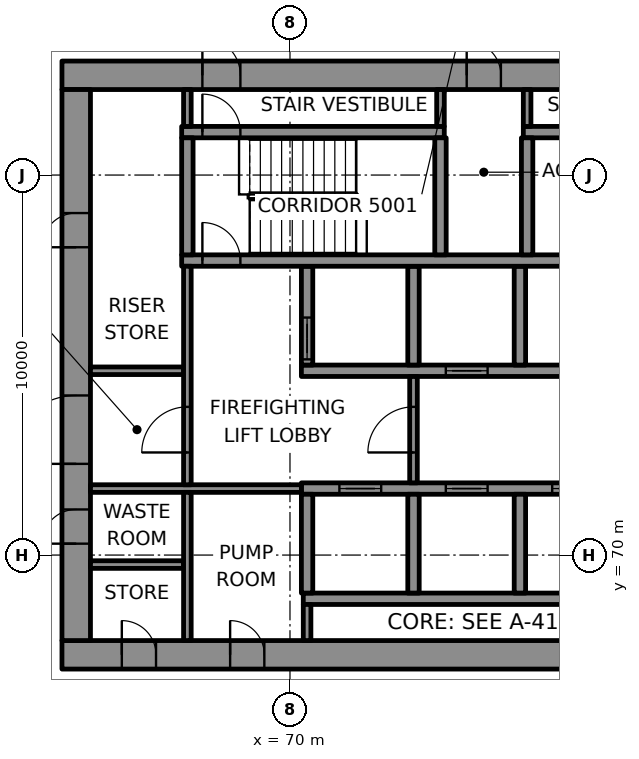
"""IFC4 building model, lengths in metres.
Left out: names, types, materials, properties, quantities, classifications, styles, units other than length and angle.
Written with IfcOpenShell. Run it as: python <this file> out.ifc"""

import sys

from ifc_helpers import new_model, si_unit, direction, frame, frame_2d, origin, place, context, subcontext, project, spatial, rectangle, extrude, element, fill, save


model = new_model("IFC4")
c1 = context("Model", 3, precision=1e-05, world=origin(), true_north=direction((0.0, 1.0)))
c2 = subcontext(c1, "Body", "Model", "MODEL_VIEW")
j1 = project(units=[si_unit("LENGTHUNIT", "METRE"), si_unit("PLANEANGLEUNIT", "RADIAN")], contexts=[c1])
p1 = place(None, origin())
s1 = spatial("IfcSite", under=j1, at=p1, CompositionType="ELEMENT")
p2 = place(p1, origin())
s2 = spatial("IfcBuilding", under=s1, at=p2, CompositionType="ELEMENT")
p3 = place(p2, frame((0.0, 0.0, 214.3)))
s3 = spatial("IfcBuildingStorey", under=s2, at=p3, CompositionType="ELEMENT", Elevation=214.3)
p4 = place(p3, frame((64.0, 67.375, 0.0), z_axis=(0.0, 0.0, 1.0), x_axis=(1.0, 0.0, 0.0)))
e1 = element("IfcWall", 1, at=p4, inside=s3, PredefinedType="SHEAR", context=c2, shape_type="SweptSolid", body=[
    extrude(rectangle(XDim=22.0, YDim=0.75, at=frame_2d((11.0, 0.0))), origin(), (0.0, 0.0, 1.0), 3.7),
])
p5 = place(p4, frame((1.575, 0.0, 0.0)))
e2 = element("IfcOpeningElement", 2, at=p5, cuts=e1, PredefinedType="OPENING", context=c2, shape_type="SweptSolid", body=[
    extrude(rectangle(XDim=0.9, YDim=2.1, at=frame_2d((0.45, 1.05))), frame((0.0, 0.385, 0.0), z_axis=(0.0, -1.0, 0.0), x_axis=(1.0, 0.0, 0.0)), (0.0, 0.0, 1.0), 0.77),
])
p6 = place(p4, frame((4.425, 0.0, 0.0)))
e3 = element("IfcOpeningElement", 3, at=p6, cuts=e1, PredefinedType="OPENING", context=c2, shape_type="SweptSolid", body=[
    extrude(rectangle(XDim=0.9, YDim=2.1, at=frame_2d((0.45, 1.05))), frame((0.0, 0.385, 0.0), z_axis=(0.0, -1.0, 0.0), x_axis=(1.0, 0.0, 0.0)), (0.0, 0.0, 1.0), 0.77),
])
p7 = place(p3, frame((64.0, 82.625, 0.0), z_axis=(0.0, 0.0, 1.0), x_axis=(1.0, 0.0, 0.0)))
e4 = element("IfcWall", 4, at=p7, inside=s3, PredefinedType="SHEAR", context=c2, shape_type="SweptSolid", body=[
    extrude(rectangle(XDim=22.0, YDim=0.75, at=frame_2d((11.0, 0.0))), origin(), (0.0, 0.0, 1.0), 3.7),
])
p8 = place(p7, frame((3.695, 0.0, 0.0)))
e5 = element("IfcOpeningElement", 5, at=p8, cuts=e4, PredefinedType="OPENING", context=c2, shape_type="SweptSolid", body=[
    extrude(rectangle(XDim=1.0, YDim=2.1, at=frame_2d((0.5, 1.05))), frame((0.0, 0.385, 0.0), z_axis=(0.0, -1.0, 0.0), x_axis=(1.0, 0.0, 0.0)), (0.0, 0.0, 1.0), 0.77),
])
p9 = place(p7, frame((17.505, 0.0, 0.0)))
e6 = element("IfcOpeningElement", 6, at=p9, cuts=e4, PredefinedType="OPENING", context=c2, shape_type="SweptSolid", body=[
    extrude(rectangle(XDim=1.0, YDim=2.1, at=frame_2d((0.5, 1.05))), frame((0.0, 0.385, 0.0), z_axis=(0.0, -1.0, 0.0), x_axis=(1.0, 0.0, 0.0)), (0.0, 0.0, 1.0), 0.77),
])
p10 = place(p7, frame((10.65, 0.0, 0.0)))
e7 = element("IfcOpeningElement", 7, at=p10, cuts=e4, PredefinedType="OPENING", context=c2, shape_type="SweptSolid", body=[
    extrude(rectangle(XDim=0.9, YDim=2.1, at=frame_2d((0.45, 1.05))), frame((0.0, 0.385, 0.0), z_axis=(0.0, -1.0, 0.0), x_axis=(1.0, 0.0, 0.0)), (0.0, 0.0, 1.0), 0.77),
])
p11 = place(p3, frame((64.375, 67.75, 0.0), z_axis=(0.0, 0.0, 1.0), x_axis=(0.0, 1.0, 0.0)))
e8 = element("IfcWall", 8, at=p11, inside=s3, PredefinedType="SHEAR", context=c2, shape_type="SweptSolid", body=[
    extrude(rectangle(XDim=14.5, YDim=0.75, at=frame_2d((7.25, 0.0))), origin(), (0.0, 0.0, 1.0), 3.7),
])
p12 = place(p11, frame((4.65, 0.0, 0.0)))
e9 = element("IfcOpeningElement", 9, at=p12, cuts=e8, PredefinedType="OPENING", context=c2, shape_type="SweptSolid", body=[
    extrude(rectangle(XDim=1.8, YDim=2.1, at=frame_2d((0.9, 1.05))), frame((0.0, 0.385, 0.0), z_axis=(0.0, -1.0, 0.0), x_axis=(1.0, 0.0, 0.0)), (0.0, 0.0, 1.0), 0.77),
])
p13 = place(p11, frame((2.55, 0.0, 0.0)))
e10 = element("IfcOpeningElement", 10, at=p13, cuts=e8, PredefinedType="OPENING", context=c2, shape_type="SweptSolid", body=[
    extrude(rectangle(XDim=0.9, YDim=2.1, at=frame_2d((0.45, 1.05))), frame((0.0, 0.385, 0.0), z_axis=(0.0, -1.0, 0.0), x_axis=(1.0, 0.0, 0.0)), (0.0, 0.0, 1.0), 0.77),
])
p14 = place(p11, frame((10.35, 0.0, 0.0)))
e11 = element("IfcOpeningElement", 11, at=p14, cuts=e8, PredefinedType="OPENING", context=c2, shape_type="SweptSolid", body=[
    extrude(rectangle(XDim=0.9, YDim=2.1, at=frame_2d((0.45, 1.05))), frame((0.0, 0.385, 0.0), z_axis=(0.0, -1.0, 0.0), x_axis=(1.0, 0.0, 0.0)), (0.0, 0.0, 1.0), 0.77),
])
p15 = place(p3, frame((70.35, 68.85, 0.0), z_axis=(0.0, 0.0, 1.0), x_axis=(1.0, 0.0, 0.0)))
e12 = element("IfcWall", 12, at=p15, inside=s3, PredefinedType="SHEAR", context=c2, shape_type="SweptSolid", body=[
    extrude(rectangle(XDim=14.2, YDim=0.3, at=frame_2d((7.1, 0.0))), origin(), (0.0, 0.0, 1.0), 3.7),
])
p16 = place(p3, frame((70.3, 71.75, 0.0), z_axis=(0.0, 0.0, 1.0), x_axis=(1.0, 0.0, 0.0)))
e13 = element("IfcWall", 13, at=p16, inside=s3, PredefinedType="SHEAR", context=c2, shape_type="SweptSolid", body=[
    extrude(rectangle(XDim=14.3, YDim=0.3, at=frame_2d((7.15, 0.0))), origin(), (0.0, 0.0, 1.0), 3.7),
])
p17 = place(p16, frame((1.0, 0.0, 0.0)))
e14 = element("IfcOpeningElement", 14, at=p17, cuts=e13, PredefinedType="OPENING", context=c2, shape_type="SweptSolid", body=[
    extrude(rectangle(XDim=1.1, YDim=2.1, at=frame_2d((0.55, 1.05))), frame((0.0, 0.16, 0.0), z_axis=(0.0, -1.0, 0.0), x_axis=(1.0, 0.0, 0.0)), (0.0, 0.0, 1.0), 0.32),
])
p18 = place(p16, frame((3.8, 0.0, 0.0)))
e15 = element("IfcOpeningElement", 15, at=p18, cuts=e13, PredefinedType="OPENING", context=c2, shape_type="SweptSolid", body=[
    extrude(rectangle(XDim=1.1, YDim=2.1, at=frame_2d((0.55, 1.05))), frame((0.0, 0.16, 0.0), z_axis=(0.0, -1.0, 0.0), x_axis=(1.0, 0.0, 0.0)), (0.0, 0.0, 1.0), 0.32),
])
p19 = place(p16, frame((6.6, 0.0, 0.0)))
e16 = element("IfcOpeningElement", 16, at=p19, cuts=e13, PredefinedType="OPENING", context=c2, shape_type="SweptSolid", body=[
    extrude(rectangle(XDim=1.1, YDim=2.1, at=frame_2d((0.55, 1.05))), frame((0.0, 0.16, 0.0), z_axis=(0.0, -1.0, 0.0), x_axis=(1.0, 0.0, 0.0)), (0.0, 0.0, 1.0), 0.32),
])
p20 = place(p16, frame((9.4, 0.0, 0.0)))
e17 = element("IfcOpeningElement", 17, at=p20, cuts=e13, PredefinedType="OPENING", context=c2, shape_type="SweptSolid", body=[
    extrude(rectangle(XDim=1.1, YDim=2.1, at=frame_2d((0.55, 1.05))), frame((0.0, 0.16, 0.0), z_axis=(0.0, -1.0, 0.0), x_axis=(1.0, 0.0, 0.0)), (0.0, 0.0, 1.0), 0.32),
])
p21 = place(p16, frame((12.2, 0.0, 0.0)))
e18 = element("IfcOpeningElement", 18, at=p21, cuts=e13, PredefinedType="OPENING", context=c2, shape_type="SweptSolid", body=[
    extrude(rectangle(XDim=1.1, YDim=2.1, at=frame_2d((0.55, 1.05))), frame((0.0, 0.16, 0.0), z_axis=(0.0, -1.0, 0.0), x_axis=(1.0, 0.0, 0.0)), (0.0, 0.0, 1.0), 0.32),
])
p22 = place(p3, frame((70.3, 74.85, 0.0), z_axis=(0.0, 0.0, 1.0), x_axis=(1.0, 0.0, 0.0)))
e19 = element("IfcWall", 19, at=p22, inside=s3, PredefinedType="SHEAR", context=c2, shape_type="SweptSolid", body=[
    extrude(rectangle(XDim=14.3, YDim=0.3, at=frame_2d((7.15, 0.0))), origin(), (0.0, 0.0, 1.0), 3.7),
])
p23 = place(p22, frame((3.8, 0.0, 0.0)))
e20 = element("IfcOpeningElement", 20, at=p23, cuts=e19, PredefinedType="OPENING", context=c2, shape_type="SweptSolid", body=[
    extrude(rectangle(XDim=1.1, YDim=2.1, at=frame_2d((0.55, 1.05))), frame((0.0, 0.16, 0.0), z_axis=(0.0, -1.0, 0.0), x_axis=(1.0, 0.0, 0.0)), (0.0, 0.0, 1.0), 0.32),
])
p24 = place(p22, frame((12.2, 0.0, 0.0)))
e21 = element("IfcOpeningElement", 21, at=p24, cuts=e19, PredefinedType="OPENING", context=c2, shape_type="SweptSolid", body=[
    extrude(rectangle(XDim=1.1, YDim=2.1, at=frame_2d((0.55, 1.05))), frame((0.0, 0.16, 0.0), z_axis=(0.0, -1.0, 0.0), x_axis=(1.0, 0.0, 0.0)), (0.0, 0.0, 1.0), 0.32),
])
p25 = place(p3, frame((70.45, 69.0, 0.0), z_axis=(0.0, 0.0, 1.0), x_axis=(0.0, 1.0, 0.0)))
e22 = element("IfcWall", 22, at=p25, inside=s3, PredefinedType="SHEAR", context=c2, shape_type="SweptSolid", body=[
    extrude(rectangle(XDim=2.6, YDim=0.3, at=frame_2d((1.3, 0.0))), origin(), (0.0, 0.0, 1.0), 3.7),
])
p26 = place(p3, frame((70.45, 75.0, 0.0), z_axis=(0.0, 0.0, 1.0), x_axis=(0.0, 1.0, 0.0)))
e23 = element("IfcWall", 23, at=p26, inside=s3, PredefinedType="SHEAR", context=c2, shape_type="SweptSolid", body=[
    extrude(rectangle(XDim=2.6, YDim=0.3, at=frame_2d((1.3, 0.0))), origin(), (0.0, 0.0, 1.0), 3.7),
])
p27 = place(p26, frame((0.15, 0.0, 0.0)))
e24 = element("IfcOpeningElement", 24, at=p27, cuts=e23, PredefinedType="OPENING", context=c2, shape_type="SweptSolid", body=[
    extrude(rectangle(XDim=1.1, YDim=2.1, at=frame_2d((0.55, 1.05))), frame((0.0, 0.16, 0.0), z_axis=(0.0, -1.0, 0.0), x_axis=(1.0, 0.0, 0.0)), (0.0, 0.0, 1.0), 0.32),
])
for number, where, z_axis, x_axis in (
    (25, (73.25, 69.0, 0.0), (0.0, 0.0, 1.0), (0.0, 1.0, 0.0)),
    (26, (73.25, 75.0, 0.0), (0.0, 0.0, 1.0), (0.0, 1.0, 0.0)),
    (27, (76.05, 69.0, 0.0), (0.0, 0.0, 1.0), (0.0, 1.0, 0.0)),
    (28, (76.05, 75.0, 0.0), (0.0, 0.0, 1.0), (0.0, 1.0, 0.0)),
):
    element("IfcWall", number, at=place(p3, frame(where, z_axis=z_axis, x_axis=x_axis)), inside=s3, PredefinedType="SHEAR", context=c2, shape_type="SweptSolid", body=[
        extrude(rectangle(XDim=2.6, YDim=0.3, at=frame_2d((1.3, 0.0))), origin(), (0.0, 0.0, 1.0), 3.7),
    ])
p28 = place(p3, frame((67.15, 77.75, 0.0), z_axis=(0.0, 0.0, 1.0), x_axis=(1.0, 0.0, 0.0)))
e29 = element("IfcWall", 29, at=p28, inside=s3, PredefinedType="SHEAR", context=c2, shape_type="SweptSolid", body=[
    extrude(rectangle(XDim=17.45, YDim=0.3, at=frame_2d((8.725, 0.0))), origin(), (0.0, 0.0, 1.0), 3.7),
])
p29 = place(p28, frame((0.545, 0.0, 0.0)))
e30 = element("IfcOpeningElement", 30, at=p29, cuts=e29, PredefinedType="OPENING", context=c2, shape_type="SweptSolid", body=[
    extrude(rectangle(XDim=1.0, YDim=2.1, at=frame_2d((0.5, 1.05))), frame((0.0, 0.16, 0.0), z_axis=(0.0, -1.0, 0.0), x_axis=(1.0, 0.0, 0.0)), (0.0, 0.0, 1.0), 0.32),
])
p30 = place(p3, frame((67.15, 81.13, 0.0), z_axis=(0.0, 0.0, 1.0), x_axis=(1.0, 0.0, 0.0)))
e31 = element("IfcWall", 31, at=p30, inside=s3, PredefinedType="SHEAR", context=c2, shape_type="SweptSolid", body=[
    extrude(rectangle(XDim=6.91, YDim=0.3, at=frame_2d((3.455, 0.0))), origin(), (0.0, 0.0, 1.0), 3.7),
])
p31 = place(p30, frame((0.545, 0.0, 0.0)))
e32 = element("IfcOpeningElement", 32, at=p31, cuts=e31, PredefinedType="OPENING", context=c2, shape_type="SweptSolid", body=[
    extrude(rectangle(XDim=1.0, YDim=2.1, at=frame_2d((0.5, 1.05))), frame((0.0, 0.16, 0.0), z_axis=(0.0, -1.0, 0.0), x_axis=(1.0, 0.0, 0.0)), (0.0, 0.0, 1.0), 0.32),
])
p32 = place(p3, frame((76.14, 81.13, 0.0), z_axis=(0.0, 0.0, 1.0), x_axis=(1.0, 0.0, 0.0)))
e33 = element("IfcWall", 33, at=p32, inside=s3, PredefinedType="SHEAR", context=c2, shape_type="SweptSolid", body=[
    extrude(rectangle(XDim=6.86, YDim=0.3, at=frame_2d((3.43, 0.0))), origin(), (0.0, 0.0, 1.0), 3.7),
])
p33 = place(p32, frame((5.365, 0.0, 0.0)))
e34 = element("IfcOpeningElement", 34, at=p33, cuts=e33, PredefinedType="OPENING", context=c2, shape_type="SweptSolid", body=[
    extrude(rectangle(XDim=1.0, YDim=2.1, at=frame_2d((0.5, 1.05))), frame((0.0, 0.16, 0.0), z_axis=(0.0, -1.0, 0.0), x_axis=(1.0, 0.0, 0.0)), (0.0, 0.0, 1.0), 0.32),
])
for number, where, z_axis, x_axis in (
    (35, (67.3, 77.9, 0.0), (0.0, 0.0, 1.0), (0.0, 1.0, 0.0)),
    (36, (73.96, 77.9, 0.0), (0.0, 0.0, 1.0), (0.0, 1.0, 0.0)),
    (37, (76.24, 77.9, 0.0), (0.0, 0.0, 1.0), (0.0, 1.0, 0.0)),
):
    element("IfcWall", number, at=place(p3, frame(where, z_axis=z_axis, x_axis=x_axis)), inside=s3, PredefinedType="SHEAR", context=c2, shape_type="SweptSolid", body=[
        extrude(rectangle(XDim=3.08, YDim=0.3, at=frame_2d((1.54, 0.0))), origin(), (0.0, 0.0, 1.0), 3.7),
    ])
p34 = place(p3, frame((64.75, 69.75, 0.0), z_axis=(0.0, 0.0, 1.0), x_axis=(1.0, 0.0, 0.0)))
e38 = element("IfcWall", 38, at=p34, inside=s3, PredefinedType="PARTITIONING", context=c2, shape_type="SweptSolid", body=[
    extrude(rectangle(XDim=2.45, YDim=0.2, at=frame_2d((1.225, 0.0))), origin(), (0.0, 0.0, 1.0), 3.7),
])
p35 = place(p3, frame((64.75, 71.75, 0.0), z_axis=(0.0, 0.0, 1.0), x_axis=(1.0, 0.0, 0.0)))
e39 = element("IfcWall", 39, at=p35, inside=s3, PredefinedType="PARTITIONING", context=c2, shape_type="SweptSolid", body=[
    extrude(rectangle(XDim=5.55, YDim=0.2, at=frame_2d((2.775, 0.0))), origin(), (0.0, 0.0, 1.0), 3.7),
])
p36 = place(p3, frame((64.75, 74.85, 0.0), z_axis=(0.0, 0.0, 1.0), x_axis=(1.0, 0.0, 0.0)))
e40 = element("IfcWall", 40, at=p36, inside=s3, PredefinedType="PARTITIONING", context=c2, shape_type="SweptSolid", body=[
    extrude(rectangle(XDim=2.45, YDim=0.2, at=frame_2d((1.225, 0.0))), origin(), (0.0, 0.0, 1.0), 3.7),
])
p37 = place(p3, frame((67.3, 67.75, 0.0), z_axis=(0.0, 0.0, 1.0), x_axis=(0.0, 1.0, 0.0)))
e41 = element("IfcWall", 41, at=p37, inside=s3, PredefinedType="PARTITIONING", context=c2, shape_type="SweptSolid", body=[
    extrude(rectangle(XDim=3.9, YDim=0.2, at=frame_2d((1.95, 0.0))), origin(), (0.0, 0.0, 1.0), 3.7),
])
p38 = place(p3, frame((67.3, 71.85, 0.0), z_axis=(0.0, 0.0, 1.0), x_axis=(0.0, 1.0, 0.0)))
e42 = element("IfcWall", 42, at=p38, inside=s3, PredefinedType="PARTITIONING", context=c2, shape_type="SweptSolid", body=[
    extrude(rectangle(XDim=5.75, YDim=0.2, at=frame_2d((2.875, 0.0))), origin(), (0.0, 0.0, 1.0), 3.7),
])
p39 = place(p38, frame((0.85, 0.0, 0.0)))
e43 = element("IfcOpeningElement", 43, at=p39, cuts=e42, PredefinedType="OPENING", context=c2, shape_type="SweptSolid", body=[
    extrude(rectangle(XDim=1.2, YDim=2.1, at=frame_2d((0.6, 1.05))), frame((0.0, 0.11, 0.0), z_axis=(0.0, -1.0, 0.0), x_axis=(1.0, 0.0, 0.0)), (0.0, 0.0, 1.0), 0.22),
])
p40 = place(p3, frame((67.3, 81.28, 0.0), z_axis=(0.0, 0.0, 1.0), x_axis=(0.0, 1.0, 0.0)))
e44 = element("IfcWall", 44, at=p40, inside=s3, PredefinedType="PARTITIONING", context=c2, shape_type="SweptSolid", body=[
    extrude(rectangle(XDim=0.97, YDim=0.2, at=frame_2d((0.485, 0.0))), origin(), (0.0, 0.0, 1.0), 3.7),
])
p41 = place(p3, frame((70.45, 67.75, 0.0), z_axis=(0.0, 0.0, 1.0), x_axis=(0.0, 1.0, 0.0)))
e45 = element("IfcWall", 45, at=p41, inside=s3, PredefinedType="PARTITIONING", context=c2, shape_type="SweptSolid", body=[
    extrude(rectangle(XDim=0.95, YDim=0.2, at=frame_2d((0.475, 0.0))), origin(), (0.0, 0.0, 1.0), 3.7),
])
p42 = place(p3, frame((73.25, 71.9, 0.0), z_axis=(0.0, 0.0, 1.0), x_axis=(0.0, 1.0, 0.0)))
e46 = element("IfcWall", 46, at=p42, inside=s3, PredefinedType="PARTITIONING", context=c2, shape_type="SweptSolid", body=[
    extrude(rectangle(XDim=2.8, YDim=0.2, at=frame_2d((1.4, 0.0))), origin(), (0.0, 0.0, 1.0), 3.7),
])
p43 = place(p42, frame((0.8, 0.0, 0.0)))
e47 = element("IfcOpeningElement", 47, at=p43, cuts=e46, PredefinedType="OPENING", context=c2, shape_type="SweptSolid", body=[
    extrude(rectangle(XDim=1.2, YDim=2.1, at=frame_2d((0.6, 1.05))), frame((0.0, 0.11, 0.0), z_axis=(0.0, -1.0, 0.0), x_axis=(1.0, 0.0, 0.0)), (0.0, 0.0, 1.0), 0.22),
])
for number, where, z_axis, x_axis in (
    (48, (73.96, 81.28, 0.0), (0.0, 0.0, 1.0), (0.0, 1.0, 0.0)),
    (49, (76.24, 81.28, 0.0), (0.0, 0.0, 1.0), (0.0, 1.0, 0.0)),
):
    element("IfcWall", number, at=place(p3, frame(where, z_axis=z_axis, x_axis=x_axis)), inside=s3, PredefinedType="PARTITIONING", context=c2, shape_type="SweptSolid", body=[
        extrude(rectangle(XDim=0.97, YDim=0.2, at=frame_2d((0.485, 0.0))), origin(), (0.0, 0.0, 1.0), 3.7),
    ])
p44 = place(p17, origin())
e50 = element("IfcDoor", 50, at=p44, inside=s3, OperationType="DOUBLE_DOOR_SLIDING", PredefinedType="DOOR", context=c2, shape_type="SweptSolid", body=[
    extrude(rectangle(XDim=1.1, YDim=2.1, at=frame_2d((0.55, 1.05))), frame((0.0, 0.025, 0.0), z_axis=(0.0, -1.0, 0.0), x_axis=(1.0, 0.0, 0.0)), (0.0, 0.0, 1.0), 0.05),
])
fill(e14, e50)
p45 = place(p18, origin())
e51 = element("IfcDoor", 51, at=p45, inside=s3, OperationType="DOUBLE_DOOR_SLIDING", PredefinedType="DOOR", context=c2, shape_type="SweptSolid", body=[
    extrude(rectangle(XDim=1.1, YDim=2.1, at=frame_2d((0.55, 1.05))), frame((0.0, 0.025, 0.0), z_axis=(0.0, -1.0, 0.0), x_axis=(1.0, 0.0, 0.0)), (0.0, 0.0, 1.0), 0.05),
])
fill(e15, e51)
p46 = place(p19, origin())
e52 = element("IfcDoor", 52, at=p46, inside=s3, OperationType="DOUBLE_DOOR_SLIDING", PredefinedType="DOOR", context=c2, shape_type="SweptSolid", body=[
    extrude(rectangle(XDim=1.1, YDim=2.1, at=frame_2d((0.55, 1.05))), frame((0.0, 0.025, 0.0), z_axis=(0.0, -1.0, 0.0), x_axis=(1.0, 0.0, 0.0)), (0.0, 0.0, 1.0), 0.05),
])
fill(e16, e52)
p47 = place(p27, origin())
e53 = element("IfcDoor", 53, at=p47, inside=s3, OperationType="DOUBLE_DOOR_SLIDING", PredefinedType="DOOR", context=c2, shape_type="SweptSolid", body=[
    extrude(rectangle(XDim=1.1, YDim=2.1, at=frame_2d((0.55, 1.05))), frame((0.0, 0.025, 0.0), z_axis=(0.0, -1.0, 0.0), x_axis=(1.0, 0.0, 0.0)), (0.0, 0.0, 1.0), 0.05),
])
fill(e24, e53)
p48 = place(p23, origin())
e54 = element("IfcDoor", 54, at=p48, inside=s3, OperationType="DOUBLE_DOOR_SLIDING", PredefinedType="DOOR", context=c2, shape_type="SweptSolid", body=[
    extrude(rectangle(XDim=1.1, YDim=2.1, at=frame_2d((0.55, 1.05))), frame((0.0, 0.025, 0.0), z_axis=(0.0, -1.0, 0.0), x_axis=(1.0, 0.0, 0.0)), (0.0, 0.0, 1.0), 0.05),
])
fill(e20, e54)
p49 = place(p29, origin())
e55 = element("IfcDoor", 55, at=p49, inside=s3, OperationType="SINGLE_SWING_LEFT", PredefinedType="DOOR", context=c2, shape_type="SweptSolid", body=[
    extrude(rectangle(XDim=1.0, YDim=2.1, at=frame_2d((0.5, 1.05))), frame((0.0, 0.025, 0.0), z_axis=(0.0, -1.0, 0.0), x_axis=(1.0, 0.0, 0.0)), (0.0, 0.0, 1.0), 0.05),
])
fill(e30, e55)
p50 = place(p31, origin())
e56 = element("IfcDoor", 56, at=p50, inside=s3, OperationType="SINGLE_SWING_RIGHT", PredefinedType="DOOR", context=c2, shape_type="SweptSolid", body=[
    extrude(rectangle(XDim=1.0, YDim=2.1, at=frame_2d((0.5, 1.05))), frame((0.0, 0.025, 0.0), z_axis=(0.0, -1.0, 0.0), x_axis=(1.0, 0.0, 0.0)), (0.0, 0.0, 1.0), 0.05),
])
fill(e32, e56)
p51 = place(p8, origin())
e57 = element("IfcDoor", 57, at=p51, inside=s3, OperationType="SINGLE_SWING_LEFT", PredefinedType="DOOR", context=c2, shape_type="SweptSolid", body=[
    extrude(rectangle(XDim=1.0, YDim=2.1, at=frame_2d((0.5, 1.05))), frame((0.0, 0.095, 0.0), z_axis=(0.0, -1.0, 0.0), x_axis=(1.0, 0.0, 0.0)), (0.0, 0.0, 1.0), 0.19),
])
fill(e5, e57)
p52 = place(p43, origin())
e58 = element("IfcDoor", 58, at=p52, inside=s3, OperationType="SINGLE_SWING_LEFT", PredefinedType="DOOR", context=c2, shape_type="SweptSolid", body=[
    extrude(rectangle(XDim=1.2, YDim=2.1, at=frame_2d((0.6, 1.05))), frame((0.0, 0.025, 0.0), z_axis=(0.0, -1.0, 0.0), x_axis=(1.0, 0.0, 0.0)), (0.0, 0.0, 1.0), 0.05),
])
fill(e47, e58)
p53 = place(p39, origin())
e59 = element("IfcDoor", 59, at=p53, inside=s3, OperationType="SINGLE_SWING_RIGHT", PredefinedType="DOOR", context=c2, shape_type="SweptSolid", body=[
    extrude(rectangle(XDim=1.2, YDim=2.1, at=frame_2d((0.6, 1.05))), frame((0.0, 0.025, 0.0), z_axis=(0.0, -1.0, 0.0), x_axis=(1.0, 0.0, 0.0)), (0.0, 0.0, 1.0), 0.05),
])
fill(e43, e59)
p54 = place(p12, origin())
e60 = element("IfcDoor", 60, at=p54, inside=s3, OperationType="SINGLE_SWING_LEFT", PredefinedType="DOOR", context=c2, shape_type="SweptSolid", body=[
    extrude(rectangle(XDim=1.8, YDim=2.1, at=frame_2d((0.9, 1.05))), frame((0.0, 0.095, 0.0), z_axis=(0.0, -1.0, 0.0), x_axis=(1.0, 0.0, 0.0)), (0.0, 0.0, 1.0), 0.19),
])
fill(e9, e60)
p55 = place(p5, origin())
e61 = element("IfcDoor", 61, at=p55, inside=s3, OperationType="SINGLE_SWING_LEFT", PredefinedType="DOOR", context=c2, shape_type="SweptSolid", body=[
    extrude(rectangle(XDim=0.9, YDim=2.1, at=frame_2d((0.45, 1.05))), frame((0.0, 0.095, 0.0), z_axis=(0.0, -1.0, 0.0), x_axis=(1.0, 0.0, 0.0)), (0.0, 0.0, 1.0), 0.19),
])
fill(e2, e61)
p56 = place(p13, origin())
e62 = element("IfcDoor", 62, at=p56, inside=s3, OperationType="SINGLE_SWING_RIGHT", PredefinedType="DOOR", context=c2, shape_type="SweptSolid", body=[
    extrude(rectangle(XDim=0.9, YDim=2.1, at=frame_2d((0.45, 1.05))), frame((0.0, 0.095, 0.0), z_axis=(0.0, -1.0, 0.0), x_axis=(1.0, 0.0, 0.0)), (0.0, 0.0, 1.0), 0.19),
])
fill(e10, e62)
p57 = place(p6, origin())
e63 = element("IfcDoor", 63, at=p57, inside=s3, OperationType="SINGLE_SWING_LEFT", PredefinedType="DOOR", context=c2, shape_type="SweptSolid", body=[
    extrude(rectangle(XDim=0.9, YDim=2.1, at=frame_2d((0.45, 1.05))), frame((0.0, 0.095, 0.0), z_axis=(0.0, -1.0, 0.0), x_axis=(1.0, 0.0, 0.0)), (0.0, 0.0, 1.0), 0.19),
])
fill(e3, e63)
p58 = place(p14, origin())
e64 = element("IfcDoor", 64, at=p58, inside=s3, OperationType="SINGLE_SWING_RIGHT", PredefinedType="DOOR", context=c2, shape_type="SweptSolid", body=[
    extrude(rectangle(XDim=0.9, YDim=2.1, at=frame_2d((0.45, 1.05))), frame((0.0, 0.095, 0.0), z_axis=(0.0, -1.0, 0.0), x_axis=(1.0, 0.0, 0.0)), (0.0, 0.0, 1.0), 0.19),
])
fill(e11, e64)
p59 = place(p10, origin())
e65 = element("IfcDoor", 65, at=p59, inside=s3, OperationType="SINGLE_SWING_LEFT", PredefinedType="DOOR", context=c2, shape_type="SweptSolid", body=[
    extrude(rectangle(XDim=0.9, YDim=2.1, at=frame_2d((0.45, 1.05))), frame((0.0, 0.095, 0.0), z_axis=(0.0, -1.0, 0.0), x_axis=(1.0, 0.0, 0.0)), (0.0, 0.0, 1.0), 0.19),
])
fill(e7, e65)
save(model, sys.argv[1])
